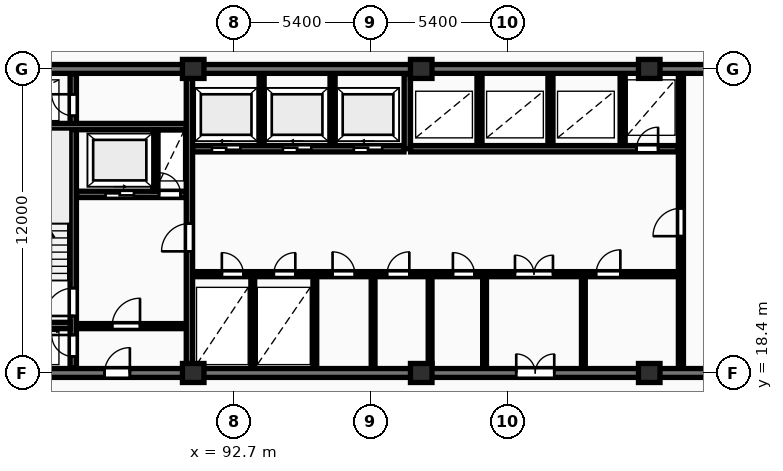
"""IFC4 building model, lengths in metres.
Left out: names, types, materials, properties, quantities, classifications, styles, units other than length and angle.
Written with IfcOpenShell. Run it as: python <this file> out.ifc"""

import sys

from ifc_helpers import new_model, si_unit, direction, frame, frame_2d, origin, origin_2d, place, context, subcontext, project, spatial, rectangle, extrude, element, fill, save


model = new_model("IFC4")
c1 = context("Model", 3, precision=1e-05, world=origin(), true_north=direction((0.0, 1.0)))
c2 = subcontext(c1, "Body", "Model", "MODEL_VIEW")
j1 = project(units=[si_unit("LENGTHUNIT", "METRE"), si_unit("PLANEANGLEUNIT", "RADIAN")], contexts=[c1])
p1 = place(None, origin())
s1 = spatial("IfcSite", under=j1, at=p1, CompositionType="ELEMENT")
p2 = place(p1, origin())
s2 = spatial("IfcBuilding", under=s1, at=p2, CompositionType="ELEMENT")
p3 = place(p2, frame((0.0, 0.0, 87.3)))
s3 = spatial("IfcBuildingStorey", under=s2, at=p3, CompositionType="ELEMENT", Elevation=87.3)
for number, where, z_axis, x_axis in (
    (1, (91.1, 18.4, 0.0), (0.0, 0.0, 1.0), (1.0, 0.0, 0.0)),
    (2, (91.1, 30.4, 0.0), (0.0, 0.0, 1.0), (1.0, 0.0, 0.0)),
    (3, (100.1, 18.4, 0.0), (0.0, 0.0, 1.0), (1.0, 0.0, 0.0)),
    (4, (100.1, 30.4, 0.0), (0.0, 0.0, 1.0), (1.0, 0.0, 0.0)),
    (5, (109.1, 18.4, 0.0), (0.0, 0.0, 1.0), (1.0, 0.0, 0.0)),
    (6, (109.1, 30.4, 0.0), (0.0, 0.0, 1.0), (1.0, 0.0, 0.0)),
):
    element("IfcColumn", number, at=place(p3, frame(where, z_axis=z_axis, x_axis=x_axis)), inside=s3, PredefinedType="COLUMN", context=c2, shape_type="SweptSolid", body=[
        extrude(rectangle(XDim=0.85, YDim=0.75, at=origin_2d()), origin(), (0.0, 0.0, 1.0), 3.25),
    ])
p4 = place(p3, frame((81.925, 30.4, 0.0), z_axis=(0.0, 0.0, 1.0), x_axis=(1.0, 0.0, 0.0)))
e7 = element("IfcWall", 7, at=p4, inside=s3, PredefinedType="SHEAR", context=c2, shape_type="SweptSolid", body=[
    extrude(rectangle(XDim=36.265, YDim=0.35, at=frame_2d((18.132, 0.0))), origin(), (0.0, 0.0, 1.0), 3.25),
])
p5 = place(p3, frame((81.925, 18.4, 0.0), z_axis=(0.0, 0.0, 1.0), x_axis=(1.0, 0.0, 0.0)))
e8 = element("IfcWall", 8, at=p5, inside=s3, PredefinedType="SHEAR", context=c2, shape_type="SweptSolid", body=[
    extrude(rectangle(XDim=36.265, YDim=0.35, at=frame_2d((18.132, 0.0))), origin(), (0.0, 0.0, 1.0), 3.25),
])
p6 = place(p5, frame((5.675, 0.0, 0.0)))
e9 = element("IfcOpeningElement", 9, at=p6, cuts=e8, PredefinedType="OPENING", context=c2, shape_type="SweptSolid", body=[
    extrude(rectangle(XDim=1.0, YDim=2.15, at=frame_2d((0.5, 1.075))), frame((0.0, 0.185, 0.0), z_axis=(0.0, -1.0, 0.0), x_axis=(1.0, 0.0, 0.0)), (0.0, 0.0, 1.0), 0.37),
])
p7 = place(p5, frame((21.925, 0.0, 0.0)))
e10 = element("IfcOpeningElement", 10, at=p7, cuts=e8, PredefinedType="OPENING", context=c2, shape_type="SweptSolid", body=[
    extrude(rectangle(XDim=1.5, YDim=2.2, at=frame_2d((0.75, 1.1))), frame((0.0, 0.185, 0.0), z_axis=(0.0, -1.0, 0.0), x_axis=(1.0, 0.0, 0.0)), (0.0, 0.0, 1.0), 0.37),
])
p8 = place(p5, frame((29.875, 0.0, 0.0)))
e11 = element("IfcOpeningElement", 11, at=p8, cuts=e8, PredefinedType="OPENING", context=c2, shape_type="SweptSolid", body=[
    extrude(rectangle(XDim=1.0, YDim=2.15, at=frame_2d((0.5, 1.075))), frame((0.0, 0.185, 0.0), z_axis=(0.0, -1.0, 0.0), x_axis=(1.0, 0.0, 0.0)), (0.0, 0.0, 1.0), 0.37),
])
p9 = place(p3, frame((86.365, 18.6, 0.0), z_axis=(0.0, 0.0, 1.0), x_axis=(0.0, 1.0, 0.0)))
e12 = element("IfcWall", 12, at=p9, inside=s3, PredefinedType="SHEAR", context=c2, shape_type="SweptSolid", body=[
    extrude(rectangle(XDim=11.6, YDim=0.25, at=frame_2d((5.8, 0.0))), origin(), (0.0, 0.0, 1.0), 3.25),
])
p10 = place(p9, frame((0.45, 0.0, 0.0)))
e13 = element("IfcOpeningElement", 13, at=p10, cuts=e12, PredefinedType="OPENING", context=c2, shape_type="SweptSolid", body=[
    extrude(rectangle(XDim=0.85, YDim=2.05, at=frame_2d((0.425, 1.025))), frame((0.0, 0.135, 0.0), z_axis=(0.0, -1.0, 0.0), x_axis=(1.0, 0.0, 0.0)), (0.0, 0.0, 1.0), 0.27),
])
p11 = place(p9, frame((2.05, 0.0, 0.0)))
e14 = element("IfcOpeningElement", 14, at=p11, cuts=e12, PredefinedType="OPENING", context=c2, shape_type="SweptSolid", body=[
    extrude(rectangle(XDim=1.1, YDim=2.1, at=frame_2d((0.55, 1.05))), frame((0.0, 0.135, 0.0), z_axis=(0.0, -1.0, 0.0), x_axis=(1.0, 0.0, 0.0)), (0.0, 0.0, 1.0), 0.27),
])
p12 = place(p9, frame((9.95, 0.0, 0.0)))
e15 = element("IfcOpeningElement", 15, at=p12, cuts=e12, PredefinedType="OPENING", context=c2, shape_type="SweptSolid", body=[
    extrude(rectangle(XDim=0.85, YDim=2.05, at=frame_2d((0.425, 1.025))), frame((0.0, 0.135, 0.0), z_axis=(0.0, -1.0, 0.0), x_axis=(1.0, 0.0, 0.0)), (0.0, 0.0, 1.0), 0.27),
])
p13 = place(p3, frame((83.0, 20.275, 0.0), z_axis=(0.0, 0.0, 1.0), x_axis=(1.0, 0.0, 0.0)))
e16 = element("IfcWall", 16, at=p13, inside=s3, PredefinedType="SHEAR", context=c2, shape_type="SweptSolid", body=[
    extrude(rectangle(XDim=3.24, YDim=0.25, at=frame_2d((1.62, 0.0))), origin(), (0.0, 0.0, 1.0), 3.25),
])
p14 = place(p3, frame((83.0, 28.125, 0.0), z_axis=(0.0, 0.0, 1.0), x_axis=(1.0, 0.0, 0.0)))
e17 = element("IfcWall", 17, at=p14, inside=s3, PredefinedType="SHEAR", context=c2, shape_type="SweptSolid", body=[
    extrude(rectangle(XDim=7.82, YDim=0.25, at=frame_2d((3.91, 0.0))), origin(), (0.0, 0.0, 1.0), 3.25),
])
p15 = place(p3, frame((86.5, 25.45, 0.0), z_axis=(0.0, 0.0, 1.0), x_axis=(1.0, 0.0, 0.0)))
e18 = element("IfcWall", 18, at=p15, inside=s3, PredefinedType="SHEAR", context=c2, shape_type="SweptSolid", body=[
    extrude(rectangle(XDim=4.32, YDim=0.25, at=frame_2d((2.16, 0.0))), origin(), (0.0, 0.0, 1.0), 3.25),
])
p16 = place(p15, frame((1.14, 0.0, 0.0)))
e19 = element("IfcOpeningElement", 19, at=p16, cuts=e18, PredefinedType="OPENING", context=c2, shape_type="SweptSolid", body=[
    extrude(rectangle(XDim=1.12, YDim=2.12, at=frame_2d((0.56, 1.06))), frame((0.0, 0.135, 0.0), z_axis=(0.0, -1.0, 0.0), x_axis=(1.0, 0.0, 0.0)), (0.0, 0.0, 1.0), 0.27),
])
p17 = place(p15, frame((3.25, 0.0, 0.0)))
e20 = element("IfcOpeningElement", 20, at=p17, cuts=e18, PredefinedType="OPENING", context=c2, shape_type="SweptSolid", body=[
    extrude(rectangle(XDim=0.85, YDim=2.05, at=frame_2d((0.425, 1.025))), frame((0.0, 0.135, 0.0), z_axis=(0.0, -1.0, 0.0), x_axis=(1.0, 0.0, 0.0)), (0.0, 0.0, 1.0), 0.27),
])
p18 = place(p3, frame((89.6, 25.58, 0.0), z_axis=(0.0, 0.0, 1.0), x_axis=(0.0, 1.0, 0.0)))
e21 = element("IfcWall", 21, at=p18, inside=s3, PredefinedType="PARTITIONING", context=c2, shape_type="SweptSolid", body=[
    extrude(rectangle(XDim=2.42, YDim=0.2, at=frame_2d((1.21, 0.0))), origin(), (0.0, 0.0, 1.0), 2.97),
])
p19 = place(p3, frame((86.5, 20.25, 0.0), z_axis=(0.0, 0.0, 1.0), x_axis=(1.0, 0.0, 0.0)))
e22 = element("IfcWall", 22, at=p19, inside=s3, PredefinedType="PARTITIONING", context=c2, shape_type="SweptSolid", body=[
    extrude(rectangle(XDim=4.32, YDim=0.2, at=frame_2d((2.16, 0.0))), origin(), (0.0, 0.0, 1.0), 2.97),
])
p20 = place(p19, frame((1.4, 0.0, 0.0)))
e23 = element("IfcOpeningElement", 23, at=p20, cuts=e22, PredefinedType="OPENING", context=c2, shape_type="SweptSolid", body=[
    extrude(rectangle(XDim=1.1, YDim=2.1, at=frame_2d((0.55, 1.05))), frame((0.0, 0.11, 0.0), z_axis=(0.0, -1.0, 0.0), x_axis=(1.0, 0.0, 0.0)), (0.0, 0.0, 1.0), 0.22),
])
p21 = place(p3, frame((90.95, 18.6, 0.0), z_axis=(0.0, 0.0, 1.0), x_axis=(0.0, 1.0, 0.0)))
e24 = element("IfcWall", 24, at=p21, inside=s3, PredefinedType="SHEAR", context=c2, shape_type="SweptSolid", body=[
    extrude(rectangle(XDim=11.6, YDim=0.25, at=frame_2d((5.8, 0.0))), origin(), (0.0, 0.0, 1.0), 3.25),
])
p22 = place(p21, frame((4.6, 0.0, 0.0)))
e25 = element("IfcOpeningElement", 25, at=p22, cuts=e24, PredefinedType="OPENING", context=c2, shape_type="SweptSolid", body=[
    extrude(rectangle(XDim=1.1, YDim=2.1, at=frame_2d((0.55, 1.05))), frame((0.0, 0.135, 0.0), z_axis=(0.0, -1.0, 0.0), x_axis=(1.0, 0.0, 0.0)), (0.0, 0.0, 1.0), 0.27),
])
for number, where, z_axis, x_axis in (
    (26, (93.8, 27.38, 0.0), (0.0, 0.0, 1.0), (0.0, 1.0, 0.0)),
    (27, (96.6, 27.38, 0.0), (0.0, 0.0, 1.0), (0.0, 1.0, 0.0)),
):
    element("IfcWall", number, at=place(p3, frame(where, z_axis=z_axis, x_axis=x_axis)), inside=s3, PredefinedType="PARTITIONING", context=c2, shape_type="SweptSolid", body=[
        extrude(rectangle(XDim=2.82, YDim=0.2, at=frame_2d((1.41, 0.0))), origin(), (0.0, 0.0, 1.0), 2.97),
    ])
p23 = place(p3, frame((91.08, 27.25, 0.0), z_axis=(0.0, 0.0, 1.0), x_axis=(1.0, 0.0, 0.0)))
e28 = element("IfcWall", 28, at=p23, inside=s3, PredefinedType="SHEAR", context=c2, shape_type="SweptSolid", body=[
    extrude(rectangle(XDim=8.34, YDim=0.25, at=frame_2d((4.17, 0.0))), origin(), (0.0, 0.0, 1.0), 3.25),
])
p24 = place(p23, frame((0.76, 0.0, 0.0)))
e29 = element("IfcOpeningElement", 29, at=p24, cuts=e28, PredefinedType="OPENING", context=c2, shape_type="SweptSolid", body=[
    extrude(rectangle(XDim=1.12, YDim=2.12, at=frame_2d((0.56, 1.06))), frame((0.0, 0.135, 0.0), z_axis=(0.0, -1.0, 0.0), x_axis=(1.0, 0.0, 0.0)), (0.0, 0.0, 1.0), 0.27),
])
p25 = place(p23, frame((3.56, 0.0, 0.0)))
e30 = element("IfcOpeningElement", 30, at=p25, cuts=e28, PredefinedType="OPENING", context=c2, shape_type="SweptSolid", body=[
    extrude(rectangle(XDim=1.12, YDim=2.12, at=frame_2d((0.56, 1.06))), frame((0.0, 0.135, 0.0), z_axis=(0.0, -1.0, 0.0), x_axis=(1.0, 0.0, 0.0)), (0.0, 0.0, 1.0), 0.27),
])
p26 = place(p23, frame((6.36, 0.0, 0.0)))
e31 = element("IfcOpeningElement", 31, at=p26, cuts=e28, PredefinedType="OPENING", context=c2, shape_type="SweptSolid", body=[
    extrude(rectangle(XDim=1.12, YDim=2.12, at=frame_2d((0.56, 1.06))), frame((0.0, 0.135, 0.0), z_axis=(0.0, -1.0, 0.0), x_axis=(1.0, 0.0, 0.0)), (0.0, 0.0, 1.0), 0.27),
])
p27 = place(p3, frame((99.55, 27.25, 0.0), z_axis=(0.0, 0.0, 1.0), x_axis=(0.0, 1.0, 0.0)))
e32 = element("IfcWall", 32, at=p27, inside=s3, PredefinedType="SHEAR", context=c2, shape_type="SweptSolid", body=[
    extrude(rectangle(XDim=2.95, YDim=0.25, at=frame_2d((1.475, 0.0))), origin(), (0.0, 0.0, 1.0), 3.25),
])
for number, where, z_axis, x_axis in (
    (33, (102.4, 27.38, 0.0), (0.0, 0.0, 1.0), (0.0, 1.0, 0.0)),
    (34, (105.2, 27.38, 0.0), (0.0, 0.0, 1.0), (0.0, 1.0, 0.0)),
    (35, (108.05, 27.38, 0.0), (0.0, 0.0, 1.0), (0.0, 1.0, 0.0)),
):
    element("IfcWall", number, at=place(p3, frame(where, z_axis=z_axis, x_axis=x_axis)), inside=s3, PredefinedType="PARTITIONING", context=c2, shape_type="SweptSolid", body=[
        extrude(rectangle(XDim=2.82, YDim=0.2, at=frame_2d((1.41, 0.0))), origin(), (0.0, 0.0, 1.0), 2.97),
    ])
p28 = place(p3, frame((99.68, 27.25, 0.0), z_axis=(0.0, 0.0, 1.0), x_axis=(1.0, 0.0, 0.0)))
e36 = element("IfcWall", 36, at=p28, inside=s3, PredefinedType="SHEAR", context=c2, shape_type="SweptSolid", body=[
    extrude(rectangle(XDim=10.54, YDim=0.25, at=frame_2d((5.27, 0.0))), origin(), (0.0, 0.0, 1.0), 3.25),
])
p29 = place(p28, frame((8.92, 0.0, 0.0)))
e37 = element("IfcOpeningElement", 37, at=p29, cuts=e36, PredefinedType="OPENING", context=c2, shape_type="SweptSolid", body=[
    extrude(rectangle(XDim=0.85, YDim=2.05, at=frame_2d((0.425, 1.025))), frame((0.0, 0.135, 0.0), z_axis=(0.0, -1.0, 0.0), x_axis=(1.0, 0.0, 0.0)), (0.0, 0.0, 1.0), 0.27),
])
for number, where, z_axis, x_axis in (
    (38, (93.45, 18.6, 0.0), (0.0, 0.0, 1.0), (0.0, 1.0, 0.0)),
    (39, (95.9, 18.6, 0.0), (0.0, 0.0, 1.0), (0.0, 1.0, 0.0)),
    (40, (98.2, 18.6, 0.0), (0.0, 0.0, 1.0), (0.0, 1.0, 0.0)),
    (41, (100.45, 18.6, 0.0), (0.0, 0.0, 1.0), (0.0, 1.0, 0.0)),
    (42, (102.6, 18.6, 0.0), (0.0, 0.0, 1.0), (0.0, 1.0, 0.0)),
    (43, (106.5, 18.6, 0.0), (0.0, 0.0, 1.0), (0.0, 1.0, 0.0)),
):
    element("IfcWall", number, at=place(p3, frame(where, z_axis=z_axis, x_axis=x_axis)), inside=s3, PredefinedType="PARTITIONING", context=c2, shape_type="SweptSolid", body=[
        extrude(rectangle(XDim=3.6, YDim=0.15, at=frame_2d((1.8, 0.0))), origin(), (0.0, 0.0, 1.0), 2.97),
    ])
p30 = place(p3, frame((91.08, 22.3, 0.0), z_axis=(0.0, 0.0, 1.0), x_axis=(1.0, 0.0, 0.0)))
e44 = element("IfcWall", 44, at=p30, inside=s3, PredefinedType="PARTITIONING", context=c2, shape_type="SweptSolid", body=[
    extrude(rectangle(XDim=19.14, YDim=0.2, at=frame_2d((9.57, 0.0))), origin(), (0.0, 0.0, 1.0), 2.97),
])
p31 = place(p30, frame((1.15, 0.0, 0.0)))
e45 = element("IfcOpeningElement", 45, at=p31, cuts=e44, PredefinedType="OPENING", context=c2, shape_type="SweptSolid", body=[
    extrude(rectangle(XDim=0.85, YDim=2.05, at=frame_2d((0.425, 1.025))), frame((0.0, 0.11, 0.0), z_axis=(0.0, -1.0, 0.0), x_axis=(1.0, 0.0, 0.0)), (0.0, 0.0, 1.0), 0.22),
])
p32 = place(p30, frame((3.2, 0.0, 0.0)))
e46 = element("IfcOpeningElement", 46, at=p32, cuts=e44, PredefinedType="OPENING", context=c2, shape_type="SweptSolid", body=[
    extrude(rectangle(XDim=0.85, YDim=2.05, at=frame_2d((0.425, 1.025))), frame((0.0, 0.11, 0.0), z_axis=(0.0, -1.0, 0.0), x_axis=(1.0, 0.0, 0.0)), (0.0, 0.0, 1.0), 0.22),
])
p33 = place(p30, frame((12.72, 0.0, 0.0)))
e47 = element("IfcOpeningElement", 47, at=p33, cuts=e44, PredefinedType="OPENING", context=c2, shape_type="SweptSolid", body=[
    extrude(rectangle(XDim=1.5, YDim=2.2, at=frame_2d((0.75, 1.1))), frame((0.0, 0.11, 0.0), z_axis=(0.0, -1.0, 0.0), x_axis=(1.0, 0.0, 0.0)), (0.0, 0.0, 1.0), 0.22),
])
p34 = place(p30, frame((5.52, 0.0, 0.0)))
e48 = element("IfcOpeningElement", 48, at=p34, cuts=e44, PredefinedType="OPENING", context=c2, shape_type="SweptSolid", body=[
    extrude(rectangle(XDim=0.88, YDim=2.06, at=frame_2d((0.44, 1.03))), frame((0.0, 0.11, 0.0), z_axis=(0.0, -1.0, 0.0), x_axis=(1.0, 0.0, 0.0)), (0.0, 0.0, 1.0), 0.22),
])
p35 = place(p30, frame((7.67, 0.0, 0.0)))
e49 = element("IfcOpeningElement", 49, at=p35, cuts=e44, PredefinedType="OPENING", context=c2, shape_type="SweptSolid", body=[
    extrude(rectangle(XDim=0.88, YDim=2.06, at=frame_2d((0.44, 1.03))), frame((0.0, 0.11, 0.0), z_axis=(0.0, -1.0, 0.0), x_axis=(1.0, 0.0, 0.0)), (0.0, 0.0, 1.0), 0.22),
])
p36 = place(p30, frame((10.27, 0.0, 0.0)))
e50 = element("IfcOpeningElement", 50, at=p36, cuts=e44, PredefinedType="OPENING", context=c2, shape_type="SweptSolid", body=[
    extrude(rectangle(XDim=0.85, YDim=2.05, at=frame_2d((0.425, 1.025))), frame((0.0, 0.11, 0.0), z_axis=(0.0, -1.0, 0.0), x_axis=(1.0, 0.0, 0.0)), (0.0, 0.0, 1.0), 0.22),
])
p37 = place(p30, frame((15.92, 0.0, 0.0)))
e51 = element("IfcOpeningElement", 51, at=p37, cuts=e44, PredefinedType="OPENING", context=c2, shape_type="SweptSolid", body=[
    extrude(rectangle(XDim=0.96, YDim=2.1, at=frame_2d((0.48, 1.05))), frame((0.0, 0.11, 0.0), z_axis=(0.0, -1.0, 0.0), x_axis=(1.0, 0.0, 0.0)), (0.0, 0.0, 1.0), 0.22),
])
p38 = place(p3, frame((110.35, 18.6, 0.0), z_axis=(0.0, 0.0, 1.0), x_axis=(0.0, 1.0, 0.0)))
e52 = element("IfcWall", 52, at=p38, inside=s3, PredefinedType="PARTITIONING", context=c2, shape_type="SweptSolid", body=[
    extrude(rectangle(XDim=11.6, YDim=0.2, at=frame_2d((5.8, 0.0))), origin(), (0.0, 0.0, 1.0), 2.97),
])
p39 = place(p38, frame((5.2, 0.0, 0.0)))
e53 = element("IfcOpeningElement", 53, at=p39, cuts=e52, PredefinedType="OPENING", context=c2, shape_type="SweptSolid", body=[
    extrude(rectangle(XDim=1.1, YDim=2.15, at=frame_2d((0.55, 1.075))), frame((0.0, 0.11, 0.0), z_axis=(0.0, -1.0, 0.0), x_axis=(1.0, 0.0, 0.0)), (0.0, 0.0, 1.0), 0.22),
])
p40 = place(p6, origin())
e54 = element("IfcDoor", 54, at=p40, inside=s3, OperationType="SINGLE_SWING_RIGHT", PredefinedType="DOOR", context=c2, shape_type="SweptSolid", body=[
    extrude(rectangle(XDim=1.0, YDim=2.15, at=frame_2d((0.5, 1.075))), frame((0.0, 0.025, 0.0), z_axis=(0.0, -1.0, 0.0), x_axis=(1.0, 0.0, 0.0)), (0.0, 0.0, 1.0), 0.05),
])
fill(e9, e54)
p41 = place(p7, origin())
e55 = element("IfcDoor", 55, at=p41, inside=s3, OperationType="DOUBLE_DOOR_SINGLE_SWING", PredefinedType="DOOR", context=c2, shape_type="SweptSolid", body=[
    extrude(rectangle(XDim=1.5, YDim=2.2, at=frame_2d((0.75, 1.1))), frame((0.0, 0.025, 0.0), z_axis=(0.0, -1.0, 0.0), x_axis=(1.0, 0.0, 0.0)), (0.0, 0.0, 1.0), 0.05),
])
fill(e10, e55)
p42 = place(p10, origin())
e56 = element("IfcDoor", 56, at=p42, inside=s3, OperationType="SINGLE_SWING_RIGHT", PredefinedType="DOOR", context=c2, shape_type="SweptSolid", body=[
    extrude(rectangle(XDim=0.85, YDim=2.05, at=frame_2d((0.425, 1.025))), frame((0.0, 0.025, 0.0), z_axis=(0.0, -1.0, 0.0), x_axis=(1.0, 0.0, 0.0)), (0.0, 0.0, 1.0), 0.05),
])
fill(e13, e56)
p43 = place(p11, origin())
e57 = element("IfcDoor", 57, at=p43, inside=s3, OperationType="SINGLE_SWING_LEFT", PredefinedType="DOOR", context=c2, shape_type="SweptSolid", body=[
    extrude(rectangle(XDim=1.1, YDim=2.1, at=frame_2d((0.55, 1.05))), frame((0.0, 0.025, 0.0), z_axis=(0.0, -1.0, 0.0), x_axis=(1.0, 0.0, 0.0)), (0.0, 0.0, 1.0), 0.05),
])
fill(e14, e57)
p44 = place(p12, origin())
e58 = element("IfcDoor", 58, at=p44, inside=s3, OperationType="SINGLE_SWING_RIGHT", PredefinedType="DOOR", context=c2, shape_type="SweptSolid", body=[
    extrude(rectangle(XDim=0.85, YDim=2.05, at=frame_2d((0.425, 1.025))), frame((0.0, 0.025, 0.0), z_axis=(0.0, -1.0, 0.0), x_axis=(1.0, 0.0, 0.0)), (0.0, 0.0, 1.0), 0.05),
])
fill(e15, e58)
p45 = place(p16, origin())
e59 = element("IfcDoor", 59, at=p45, inside=s3, OperationType="SLIDING_TO_RIGHT", PredefinedType="DOOR", context=c2, shape_type="SweptSolid", body=[
    extrude(rectangle(XDim=1.12, YDim=2.12, at=frame_2d((0.56, 1.06))), frame((0.0, 0.025, 0.0), z_axis=(0.0, -1.0, 0.0), x_axis=(1.0, 0.0, 0.0)), (0.0, 0.0, 1.0), 0.05),
])
fill(e19, e59)
p46 = place(p17, origin())
e60 = element("IfcDoor", 60, at=p46, inside=s3, OperationType="SINGLE_SWING_LEFT", PredefinedType="DOOR", context=c2, shape_type="SweptSolid", body=[
    extrude(rectangle(XDim=0.85, YDim=2.05, at=frame_2d((0.425, 1.025))), frame((0.0, 0.025, 0.0), z_axis=(0.0, -1.0, 0.0), x_axis=(1.0, 0.0, 0.0)), (0.0, 0.0, 1.0), 0.05),
])
fill(e20, e60)
p47 = place(p20, origin())
e61 = element("IfcDoor", 61, at=p47, inside=s3, OperationType="SINGLE_SWING_RIGHT", PredefinedType="DOOR", context=c2, shape_type="SweptSolid", body=[
    extrude(rectangle(XDim=1.1, YDim=2.1, at=frame_2d((0.55, 1.05))), frame((0.0, 0.025, 0.0), z_axis=(0.0, -1.0, 0.0), x_axis=(1.0, 0.0, 0.0)), (0.0, 0.0, 1.0), 0.05),
])
fill(e23, e61)
p48 = place(p22, origin())
e62 = element("IfcDoor", 62, at=p48, inside=s3, OperationType="SINGLE_SWING_LEFT", PredefinedType="DOOR", context=c2, shape_type="SweptSolid", body=[
    extrude(rectangle(XDim=1.1, YDim=2.1, at=frame_2d((0.55, 1.05))), frame((0.0, 0.025, 0.0), z_axis=(0.0, -1.0, 0.0), x_axis=(1.0, 0.0, 0.0)), (0.0, 0.0, 1.0), 0.05),
])
fill(e25, e62)
p49 = place(p24, origin())
e63 = element("IfcDoor", 63, at=p49, inside=s3, OperationType="SLIDING_TO_LEFT", PredefinedType="DOOR", context=c2, shape_type="SweptSolid", body=[
    extrude(rectangle(XDim=1.12, YDim=2.12, at=frame_2d((0.56, 1.06))), frame((0.0, 0.025, 0.0), z_axis=(0.0, -1.0, 0.0), x_axis=(1.0, 0.0, 0.0)), (0.0, 0.0, 1.0), 0.05),
])
fill(e29, e63)
p50 = place(p25, origin())
e64 = element("IfcDoor", 64, at=p50, inside=s3, OperationType="SLIDING_TO_LEFT", PredefinedType="DOOR", context=c2, shape_type="SweptSolid", body=[
    extrude(rectangle(XDim=1.12, YDim=2.12, at=frame_2d((0.56, 1.06))), frame((0.0, 0.025, 0.0), z_axis=(0.0, -1.0, 0.0), x_axis=(1.0, 0.0, 0.0)), (0.0, 0.0, 1.0), 0.05),
])
fill(e30, e64)
p51 = place(p26, origin())
e65 = element("IfcDoor", 65, at=p51, inside=s3, OperationType="SLIDING_TO_LEFT", PredefinedType="DOOR", context=c2, shape_type="SweptSolid", body=[
    extrude(rectangle(XDim=1.12, YDim=2.12, at=frame_2d((0.56, 1.06))), frame((0.0, 0.025, 0.0), z_axis=(0.0, -1.0, 0.0), x_axis=(1.0, 0.0, 0.0)), (0.0, 0.0, 1.0), 0.05),
])
fill(e31, e65)
p52 = place(p29, origin())
e66 = element("IfcDoor", 66, at=p52, inside=s3, OperationType="SINGLE_SWING_RIGHT", PredefinedType="DOOR", context=c2, shape_type="SweptSolid", body=[
    extrude(rectangle(XDim=0.85, YDim=2.05, at=frame_2d((0.425, 1.025))), frame((0.0, 0.025, 0.0), z_axis=(0.0, -1.0, 0.0), x_axis=(1.0, 0.0, 0.0)), (0.0, 0.0, 1.0), 0.05),
])
fill(e37, e66)
p53 = place(p31, origin())
e67 = element("IfcDoor", 67, at=p53, inside=s3, OperationType="SINGLE_SWING_LEFT", PredefinedType="DOOR", context=c2, shape_type="SweptSolid", body=[
    extrude(rectangle(XDim=0.85, YDim=2.05, at=frame_2d((0.425, 1.025))), frame((0.0, 0.025, 0.0), z_axis=(0.0, -1.0, 0.0), x_axis=(1.0, 0.0, 0.0)), (0.0, 0.0, 1.0), 0.05),
])
fill(e45, e67)
p54 = place(p32, origin())
e68 = element("IfcDoor", 68, at=p54, inside=s3, OperationType="SINGLE_SWING_RIGHT", PredefinedType="DOOR", context=c2, shape_type="SweptSolid", body=[
    extrude(rectangle(XDim=0.85, YDim=2.05, at=frame_2d((0.425, 1.025))), frame((0.0, 0.025, 0.0), z_axis=(0.0, -1.0, 0.0), x_axis=(1.0, 0.0, 0.0)), (0.0, 0.0, 1.0), 0.05),
])
fill(e46, e68)
p55 = place(p33, origin())
e69 = element("IfcDoor", 69, at=p55, inside=s3, OperationType="DOUBLE_DOOR_SINGLE_SWING", PredefinedType="DOOR", context=c2, shape_type="SweptSolid", body=[
    extrude(rectangle(XDim=1.5, YDim=2.2, at=frame_2d((0.75, 1.1))), frame((0.0, 0.025, 0.0), z_axis=(0.0, -1.0, 0.0), x_axis=(1.0, 0.0, 0.0)), (0.0, 0.0, 1.0), 0.05),
])
fill(e47, e69)
p56 = place(p34, origin())
e70 = element("IfcDoor", 70, at=p56, inside=s3, OperationType="SINGLE_SWING_LEFT", PredefinedType="DOOR", context=c2, shape_type="SweptSolid", body=[
    extrude(rectangle(XDim=0.88, YDim=2.06, at=frame_2d((0.44, 1.03))), frame((0.0, 0.025, 0.0), z_axis=(0.0, -1.0, 0.0), x_axis=(1.0, 0.0, 0.0)), (0.0, 0.0, 1.0), 0.05),
])
fill(e48, e70)
p57 = place(p35, origin())
e71 = element("IfcDoor", 71, at=p57, inside=s3, OperationType="SINGLE_SWING_RIGHT", PredefinedType="DOOR", context=c2, shape_type="SweptSolid", body=[
    extrude(rectangle(XDim=0.88, YDim=2.06, at=frame_2d((0.44, 1.03))), frame((0.0, 0.025, 0.0), z_axis=(0.0, -1.0, 0.0), x_axis=(1.0, 0.0, 0.0)), (0.0, 0.0, 1.0), 0.05),
])
fill(e49, e71)
p58 = place(p36, origin())
e72 = element("IfcDoor", 72, at=p58, inside=s3, OperationType="SINGLE_SWING_LEFT", PredefinedType="DOOR", context=c2, shape_type="SweptSolid", body=[
    extrude(rectangle(XDim=0.85, YDim=2.05, at=frame_2d((0.425, 1.025))), frame((0.0, 0.025, 0.0), z_axis=(0.0, -1.0, 0.0), x_axis=(1.0, 0.0, 0.0)), (0.0, 0.0, 1.0), 0.05),
])
fill(e50, e72)
p59 = place(p37, origin())
e73 = element("IfcDoor", 73, at=p59, inside=s3, OperationType="SINGLE_SWING_RIGHT", PredefinedType="DOOR", context=c2, shape_type="SweptSolid", body=[
    extrude(rectangle(XDim=0.96, YDim=2.1, at=frame_2d((0.48, 1.05))), frame((0.0, 0.025, 0.0), z_axis=(0.0, -1.0, 0.0), x_axis=(1.0, 0.0, 0.0)), (0.0, 0.0, 1.0), 0.05),
])
fill(e51, e73)
p60 = place(p39, origin())
e74 = element("IfcDoor", 74, at=p60, inside=s3, OperationType="SINGLE_SWING_LEFT", PredefinedType="DOOR", context=c2, shape_type="SweptSolid", body=[
    extrude(rectangle(XDim=1.1, YDim=2.15, at=frame_2d((0.55, 1.075))), frame((0.0, 0.025, 0.0), z_axis=(0.0, -1.0, 0.0), x_axis=(1.0, 0.0, 0.0)), (0.0, 0.0, 1.0), 0.05),
])
fill(e53, e74)
save(model, sys.argv[1])
